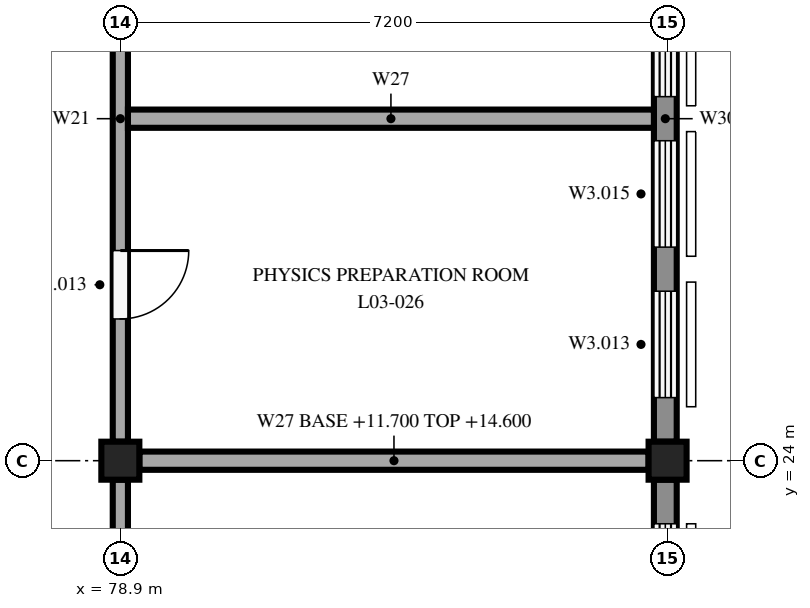
"""IFC4 building model, lengths in metres.
Left out: names, types, materials, properties, quantities, classifications, styles, units other than length and angle.
Written with IfcOpenShell. Run it as: python <this file> out.ifc"""

import sys

from ifc_helpers import new_model, si_unit, direction, frame, frame_2d, origin, origin_2d, place, context, subcontext, project, spatial, rectangle, extrude, element, fill, save


model = new_model("IFC4")
c1 = context("Model", 3, precision=1e-05, world=origin(), true_north=direction((0.0, 1.0)))
c2 = subcontext(c1, "Body", "Model", "MODEL_VIEW")
j1 = project(units=[si_unit("LENGTHUNIT", "METRE"), si_unit("PLANEANGLEUNIT", "RADIAN")], contexts=[c1])
p1 = place(None, origin())
s1 = spatial("IfcSite", under=j1, at=p1, CompositionType="ELEMENT")
p2 = place(p1, origin())
s2 = spatial("IfcBuilding", under=s1, at=p2, CompositionType="ELEMENT")
p3 = place(p2, frame((0.0, 0.0, 11.7)))
s3 = spatial("IfcBuildingStorey", under=s2, at=p3, CompositionType="ELEMENT", Elevation=11.7)
for number, where, z_axis, x_axis in (
    (1, (78.9, 24.0, 0.0), (0.0, 0.0, 1.0), (1.0, 0.0, 0.0)),
    (2, (86.1, 24.0, 0.0), (0.0, 0.0, 1.0), (1.0, 0.0, 0.0)),
):
    element("IfcColumn", number, at=place(p3, frame(where, z_axis=z_axis, x_axis=x_axis)), inside=s3, PredefinedType="COLUMN", context=c2, shape_type="SweptSolid", body=[
        extrude(rectangle(XDim=0.5, YDim=0.5, at=origin_2d()), origin(), (0.0, 0.0, 1.0), 3.35),
    ])
p4 = place(p3, frame((86.07, 23.75, 0.0), z_axis=(0.0, 0.0, 1.0), x_axis=(0.0, -1.0, 0.0)))
e3 = element("IfcWall", 3, at=p4, inside=s3, PredefinedType="STANDARD", context=c2, shape_type="SweptSolid", body=[
    extrude(rectangle(XDim=8.5, YDim=0.3, at=frame_2d((4.25, 0.0))), origin(), (0.0, 0.0, 1.0), 2.85),
])
p5 = place(p4, frame((6.52, 0.0, 0.9)))
e4 = element("IfcOpeningElement", 4, at=p5, cuts=e3, PredefinedType="OPENING", context=c2, shape_type="SweptSolid", body=[
    extrude(rectangle(XDim=1.4, YDim=1.9, at=frame_2d((0.7, 0.95))), frame((0.0, 0.16, 0.0), z_axis=(0.0, -1.0, 0.0), x_axis=(1.0, 0.0, 0.0)), (0.0, 0.0, 1.0), 0.32),
])
p6 = place(p4, frame((4.54, 0.0, 0.9)))
e5 = element("IfcOpeningElement", 5, at=p6, cuts=e3, PredefinedType="OPENING", context=c2, shape_type="SweptSolid", body=[
    extrude(rectangle(XDim=1.4, YDim=1.9, at=frame_2d((0.7, 0.95))), frame((0.0, 0.16, 0.0), z_axis=(0.0, -1.0, 0.0), x_axis=(1.0, 0.0, 0.0)), (0.0, 0.0, 1.0), 0.32),
])
p7 = place(p4, frame((2.56, 0.0, 0.9)))
e6 = element("IfcOpeningElement", 6, at=p7, cuts=e3, PredefinedType="OPENING", context=c2, shape_type="SweptSolid", body=[
    extrude(rectangle(XDim=1.4, YDim=1.9, at=frame_2d((0.7, 0.95))), frame((0.0, 0.16, 0.0), z_axis=(0.0, -1.0, 0.0), x_axis=(1.0, 0.0, 0.0)), (0.0, 0.0, 1.0), 0.32),
])
p8 = place(p4, frame((0.58, 0.0, 0.9)))
e7 = element("IfcOpeningElement", 7, at=p8, cuts=e3, PredefinedType="OPENING", context=c2, shape_type="SweptSolid", body=[
    extrude(rectangle(XDim=1.4, YDim=1.9, at=frame_2d((0.7, 0.95))), frame((0.0, 0.16, 0.0), z_axis=(0.0, -1.0, 0.0), x_axis=(1.0, 0.0, 0.0)), (0.0, 0.0, 1.0), 0.32),
])
p9 = place(p3, frame((86.07, 32.75, 0.0), z_axis=(0.0, 0.0, 1.0), x_axis=(0.0, -1.0, 0.0)))
e8 = element("IfcWall", 8, at=p9, inside=s3, PredefinedType="STANDARD", context=c2, shape_type="SweptSolid", body=[
    extrude(rectangle(XDim=8.5, YDim=0.3, at=frame_2d((4.25, 0.0))), origin(), (0.0, 0.0, 1.0), 2.85),
])
p10 = place(p9, frame((6.52, 0.0, 0.9)))
e9 = element("IfcOpeningElement", 9, at=p10, cuts=e8, PredefinedType="OPENING", context=c2, shape_type="SweptSolid", body=[
    extrude(rectangle(XDim=1.4, YDim=1.9, at=frame_2d((0.7, 0.95))), frame((0.0, 0.16, 0.0), z_axis=(0.0, -1.0, 0.0), x_axis=(1.0, 0.0, 0.0)), (0.0, 0.0, 1.0), 0.32),
])
p11 = place(p9, frame((4.54, 0.0, 0.9)))
e10 = element("IfcOpeningElement", 10, at=p11, cuts=e8, PredefinedType="OPENING", context=c2, shape_type="SweptSolid", body=[
    extrude(rectangle(XDim=1.4, YDim=1.9, at=frame_2d((0.7, 0.95))), frame((0.0, 0.16, 0.0), z_axis=(0.0, -1.0, 0.0), x_axis=(1.0, 0.0, 0.0)), (0.0, 0.0, 1.0), 0.32),
])
p12 = place(p9, frame((2.56, 0.0, 0.9)))
e11 = element("IfcOpeningElement", 11, at=p12, cuts=e8, PredefinedType="OPENING", context=c2, shape_type="SweptSolid", body=[
    extrude(rectangle(XDim=1.4, YDim=1.9, at=frame_2d((0.7, 0.95))), frame((0.0, 0.16, 0.0), z_axis=(0.0, -1.0, 0.0), x_axis=(1.0, 0.0, 0.0)), (0.0, 0.0, 1.0), 0.32),
])
p13 = place(p9, frame((0.58, 0.0, 0.9)))
e12 = element("IfcOpeningElement", 12, at=p13, cuts=e8, PredefinedType="OPENING", context=c2, shape_type="SweptSolid", body=[
    extrude(rectangle(XDim=1.4, YDim=1.9, at=frame_2d((0.7, 0.95))), frame((0.0, 0.16, 0.0), z_axis=(0.0, -1.0, 0.0), x_axis=(1.0, 0.0, 0.0)), (0.0, 0.0, 1.0), 0.32),
])
p14 = place(p3, frame((78.9, 23.75, 0.0), z_axis=(0.0, 0.0, 1.0), x_axis=(0.0, -1.0, 0.0)))
e13 = element("IfcWall", 13, at=p14, inside=s3, PredefinedType="PARTITIONING", context=c2, shape_type="SweptSolid", body=[
    extrude(rectangle(XDim=8.5, YDim=0.2, at=frame_2d((4.25, 0.0))), origin(), (0.0, 0.0, 1.0), 2.9),
])
p15 = place(p14, frame((3.35, 0.0, 0.0)))
e14 = element("IfcOpeningElement", 14, at=p15, cuts=e13, PredefinedType="OPENING", context=c2, shape_type="SweptSolid", body=[
    extrude(rectangle(XDim=1.8, YDim=2.1, at=frame_2d((0.9, 1.05))), frame((0.0, 0.11, 0.0), z_axis=(0.0, -1.0, 0.0), x_axis=(1.0, 0.0, 0.0)), (0.0, 0.0, 1.0), 0.22),
])
p16 = place(p3, frame((78.9, 32.75, 0.0), z_axis=(0.0, 0.0, 1.0), x_axis=(0.0, -1.0, 0.0)))
e15 = element("IfcWall", 15, at=p16, inside=s3, PredefinedType="PARTITIONING", context=c2, shape_type="SweptSolid", body=[
    extrude(rectangle(XDim=8.5, YDim=0.2, at=frame_2d((4.25, 0.0))), origin(), (0.0, 0.0, 1.0), 2.9),
])
p17 = place(p16, frame((5.985, 0.0, 0.0)))
e16 = element("IfcOpeningElement", 16, at=p17, cuts=e15, PredefinedType="OPENING", context=c2, shape_type="SweptSolid", body=[
    extrude(rectangle(XDim=0.9, YDim=2.1, at=frame_2d((0.45, 1.05))), frame((0.0, 0.11, 0.0), z_axis=(0.0, -1.0, 0.0), x_axis=(1.0, 0.0, 0.0)), (0.0, 0.0, 1.0), 0.22),
])
p18 = place(p3, frame((79.15, 24.0, 0.0), z_axis=(0.0, 0.0, 1.0), x_axis=(1.0, 0.0, 0.0)))
e17 = element("IfcWall", 17, at=p18, inside=s3, PredefinedType="PARTITIONING", context=c2, shape_type="SweptSolid", body=[
    extrude(rectangle(XDim=6.7, YDim=0.24, at=frame_2d((3.35, 0.0))), origin(), (0.0, 0.0, 1.0), 2.9),
])
p19 = place(p3, frame((79.0, 28.5, 0.0), z_axis=(0.0, 0.0, 1.0), x_axis=(1.0, 0.0, 0.0)))
e18 = element("IfcWall", 18, at=p19, inside=s3, PredefinedType="PARTITIONING", context=c2, shape_type="SweptSolid", body=[
    extrude(rectangle(XDim=6.92, YDim=0.24, at=frame_2d((3.46, 0.0))), origin(), (0.0, 0.0, 1.0), 3.35),
])
p20 = place(p8, origin())
e19 = element("IfcWindow", 19, at=p20, inside=s3, PartitioningType="DOUBLE_PANEL_VERTICAL", PredefinedType="WINDOW", context=c2, shape_type="SweptSolid", body=[
    extrude(rectangle(XDim=1.4, YDim=1.9, at=frame_2d((0.7, 0.95))), frame((0.0, 0.03, 0.0), z_axis=(0.0, -1.0, 0.0), x_axis=(1.0, 0.0, 0.0)), (0.0, 0.0, 1.0), 0.06),
])
fill(e7, e19)
p21 = place(p10, origin())
e20 = element("IfcWindow", 20, at=p21, inside=s3, PartitioningType="DOUBLE_PANEL_VERTICAL", PredefinedType="WINDOW", context=c2, shape_type="SweptSolid", body=[
    extrude(rectangle(XDim=1.4, YDim=1.9, at=frame_2d((0.7, 0.95))), frame((0.0, 0.03, 0.0), z_axis=(0.0, -1.0, 0.0), x_axis=(1.0, 0.0, 0.0)), (0.0, 0.0, 1.0), 0.06),
])
fill(e9, e20)
p22 = place(p11, origin())
e21 = element("IfcWindow", 21, at=p22, inside=s3, PartitioningType="DOUBLE_PANEL_VERTICAL", PredefinedType="WINDOW", context=c2, shape_type="SweptSolid", body=[
    extrude(rectangle(XDim=1.4, YDim=1.9, at=frame_2d((0.7, 0.95))), frame((0.0, 0.03, 0.0), z_axis=(0.0, -1.0, 0.0), x_axis=(1.0, 0.0, 0.0)), (0.0, 0.0, 1.0), 0.06),
])
fill(e10, e21)
p23 = place(p12, origin())
e22 = element("IfcWindow", 22, at=p23, inside=s3, PartitioningType="DOUBLE_PANEL_VERTICAL", PredefinedType="WINDOW", context=c2, shape_type="SweptSolid", body=[
    extrude(rectangle(XDim=1.4, YDim=1.9, at=frame_2d((0.7, 0.95))), frame((0.0, 0.03, 0.0), z_axis=(0.0, -1.0, 0.0), x_axis=(1.0, 0.0, 0.0)), (0.0, 0.0, 1.0), 0.06),
])
fill(e11, e22)
p24 = place(p17, origin())
e23 = element("IfcDoor", 23, at=p24, inside=s3, OperationType="SINGLE_SWING_LEFT", PredefinedType="DOOR", context=c2, shape_type="SweptSolid", body=[
    extrude(rectangle(XDim=0.9, YDim=2.1, at=frame_2d((0.45, 1.05))), frame((0.0, 0.025, 0.0), z_axis=(0.0, -1.0, 0.0), x_axis=(1.0, 0.0, 0.0)), (0.0, 0.0, 1.0), 0.05),
])
fill(e16, e23)
save(model, sys.argv[1])
